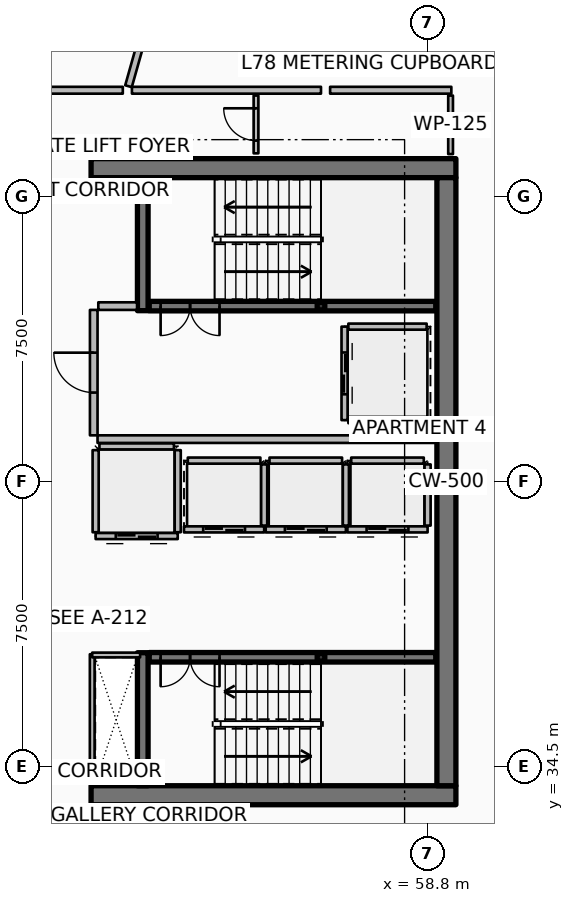
"""IFC4 building model, lengths in metres.
Left out: names, types, materials, properties, quantities, classifications, styles, units other than length and angle.
Written with IfcOpenShell. Run it as: python <this file> out.ifc"""

import sys

from ifc_helpers import new_model, si_unit, direction, frame, frame_2d, origin, origin_2d, place, context, subcontext, project, spatial, rectangle, hollow_rectangle, extrude, element, fill, save


model = new_model("IFC4")
c1 = context("Model", 3, precision=1e-05, world=origin(), true_north=direction((0.0, 1.0)))
c2 = subcontext(c1, "Body", "Model", "MODEL_VIEW")
j1 = project(units=[si_unit("LENGTHUNIT", "METRE"), si_unit("PLANEANGLEUNIT", "RADIAN")], contexts=[c1])
p1 = place(None, origin())
s1 = spatial("IfcSite", under=j1, at=p1, CompositionType="ELEMENT")
p2 = place(p1, origin())
s2 = spatial("IfcBuilding", under=s1, at=p2, CompositionType="ELEMENT")
p3 = place(p2, frame((0.0, 0.0, 309.85)))
s3 = spatial("IfcBuildingStorey", under=s2, at=p3, CompositionType="ELEMENT", Elevation=309.85)
for number, where, z_axis, x_axis in (
    (1, (49.95, 33.75, 0.0), (0.0, 0.0, 1.0), (1.0, 0.0, 0.0)),
    (2, (49.95, 50.25, 0.0), (0.0, 0.0, 1.0), (1.0, 0.0, 0.0)),
):
    element("IfcWall", number, at=place(p3, frame(where, z_axis=z_axis, x_axis=x_axis)), inside=s3, PredefinedType="SHEAR", context=c2, shape_type="SweptSolid", body=[
        extrude(rectangle(XDim=9.6, YDim=0.5, at=frame_2d((4.8, 0.0))), origin(), (0.0, 0.0, 1.0), 3.85),
    ])
p4 = place(p3, frame((59.3, 34.0, 0.0), z_axis=(0.0, 0.0, 1.0), x_axis=(0.0, 1.0, 0.0)))
e3 = element("IfcWall", 3, at=p4, inside=s3, PredefinedType="SHEAR", context=c2, shape_type="SweptSolid", body=[
    extrude(rectangle(XDim=16.0, YDim=0.5, at=frame_2d((8.0, 0.0))), origin(), (0.0, 0.0, 1.0), 3.85),
])
for number, where, z_axis, x_axis in (
    (4, (51.31, 46.5, 0.0), (0.0, 0.0, 1.0), (0.0, 1.0, 0.0)),
    (5, (51.31, 34.0, 0.0), (0.0, 0.0, 1.0), (0.0, 1.0, 0.0)),
):
    element("IfcWall", number, at=place(p3, frame(where, z_axis=z_axis, x_axis=x_axis)), inside=s3, PredefinedType="SHEAR", context=c2, shape_type="SweptSolid", body=[
        extrude(rectangle(XDim=3.5, YDim=0.28, at=frame_2d((1.75, 0.0))), origin(), (0.0, 0.0, 1.0), 3.85),
    ])
for number, where, z_axis, x_axis in (
    (6, (56.0, 46.62, 0.0), (0.0, 0.0, 1.0), (1.0, 0.0, 0.0)),
    (7, (56.0, 37.38, 0.0), (0.0, 0.0, 1.0), (1.0, 0.0, 0.0)),
):
    element("IfcColumn", number, at=place(p3, frame(where, z_axis=z_axis, x_axis=x_axis)), inside=s3, PredefinedType="COLUMN", context=c2, shape_type="SweptSolid", body=[
        extrude(hollow_rectangle(XDim=0.2, YDim=0.2, WallThickness=0.01, InnerFilletRadius=0.01, OuterFilletRadius=0.02, at=origin_2d()), origin(), (0.0, 0.0, 1.0), 1.72),
    ])
p5 = place(p3, frame((51.48, 46.62, 0.0), z_axis=(0.0, 0.0, 1.0), x_axis=(1.0, 0.0, 0.0)))
e8 = element("IfcWall", 8, at=p5, inside=s3, PredefinedType="SOLIDWALL", context=c2, shape_type="SweptSolid", body=[
    extrude(rectangle(XDim=7.54, YDim=0.25, at=frame_2d((3.77, 0.0))), origin(), (0.0, 0.0, 1.0), 3.45),
])
p6 = place(p5, frame((0.3, 0.0, 0.0)))
e9 = element("IfcOpeningElement", 9, at=p6, cuts=e8, PredefinedType="OPENING", context=c2, shape_type="SweptSolid", body=[
    extrude(rectangle(XDim=1.55, YDim=2.15, at=frame_2d((0.775, 1.075))), frame((0.0, 0.135, 0.0), z_axis=(0.0, -1.0, 0.0), x_axis=(1.0, 0.0, 0.0)), (0.0, 0.0, 1.0), 0.27),
])
p7 = place(p3, frame((51.48, 37.38, 0.0), z_axis=(0.0, 0.0, 1.0), x_axis=(1.0, 0.0, 0.0)))
e10 = element("IfcWall", 10, at=p7, inside=s3, PredefinedType="SOLIDWALL", context=c2, shape_type="SweptSolid", body=[
    extrude(rectangle(XDim=7.54, YDim=0.25, at=frame_2d((3.77, 0.0))), origin(), (0.0, 0.0, 1.0), 3.45),
])
p8 = place(p7, frame((0.3, 0.0, 0.0)))
e11 = element("IfcOpeningElement", 11, at=p8, cuts=e10, PredefinedType="OPENING", context=c2, shape_type="SweptSolid", body=[
    extrude(rectangle(XDim=1.55, YDim=2.15, at=frame_2d((0.775, 1.075))), frame((0.0, 0.135, 0.0), z_axis=(0.0, -1.0, 0.0), x_axis=(1.0, 0.0, 0.0)), (0.0, 0.0, 1.0), 0.27),
])
p9 = place(p3, frame((54.505, 40.745, 0.0), z_axis=(0.0, 0.0, 1.0), x_axis=(-1.0, 0.0, 0.0)))
e12 = element("IfcWall", 12, at=p9, inside=s3, PredefinedType="PARTITIONING", context=c2, shape_type="SweptSolid", body=[
    extrude(rectangle(XDim=2.11, YDim=0.16, at=frame_2d((1.055, 0.0))), origin(), (0.0, 0.0, 1.0), 3.45),
])
p10 = place(p9, frame((0.505, 0.0, 0.0)))
e13 = element("IfcOpeningElement", 13, at=p10, cuts=e12, PredefinedType="OPENING", context=c2, shape_type="SweptSolid", body=[
    extrude(rectangle(XDim=1.1, YDim=2.1, at=frame_2d((0.55, 1.05))), frame((0.0, 0.09, 0.0), z_axis=(0.0, -1.0, 0.0), x_axis=(1.0, 0.0, 0.0)), (0.0, 0.0, 1.0), 0.18),
])
p11 = place(p3, frame((54.505, 40.845, 0.0), z_axis=(0.0, 0.0, 1.0), x_axis=(0.0, 1.0, 0.0)))
e14 = element("IfcWall", 14, at=p11, inside=s3, PredefinedType="PARTITIONING", context=c2, shape_type="SweptSolid", body=[
    extrude(rectangle(XDim=1.61, YDim=0.16, at=frame_2d((0.805, 0.0))), origin(), (0.0, 0.0, 1.0), 3.45),
])
p12 = place(p3, frame((52.495, 42.555, 0.0), z_axis=(0.0, 0.0, 1.0), x_axis=(1.0, 0.0, 0.0)))
e15 = element("IfcWall", 15, at=p12, inside=s3, PredefinedType="PARTITIONING", context=c2, shape_type="SweptSolid", body=[
    extrude(rectangle(XDim=1.91, YDim=0.16, at=frame_2d((0.955, 0.0))), origin(), (0.0, 0.0, 1.0), 3.45),
])
p13 = place(p3, frame((56.655, 40.745, 0.0), z_axis=(0.0, 0.0, 1.0), x_axis=(-1.0, 0.0, 0.0)))
e16 = element("IfcWall", 16, at=p13, inside=s3, PredefinedType="PARTITIONING", context=c2, shape_type="SweptSolid", body=[
    extrude(rectangle(XDim=2.11, YDim=0.16, at=frame_2d((1.055, 0.0))), origin(), (0.0, 0.0, 1.0), 3.45),
])
p14 = place(p13, frame((0.505, 0.0, 0.0)))
e17 = element("IfcOpeningElement", 17, at=p14, cuts=e16, PredefinedType="OPENING", context=c2, shape_type="SweptSolid", body=[
    extrude(rectangle(XDim=1.1, YDim=2.1, at=frame_2d((0.55, 1.05))), frame((0.0, 0.09, 0.0), z_axis=(0.0, -1.0, 0.0), x_axis=(1.0, 0.0, 0.0)), (0.0, 0.0, 1.0), 0.18),
])
p15 = place(p3, frame((56.655, 40.845, 0.0), z_axis=(0.0, 0.0, 1.0), x_axis=(0.0, 1.0, 0.0)))
e18 = element("IfcWall", 18, at=p15, inside=s3, PredefinedType="PARTITIONING", context=c2, shape_type="SweptSolid", body=[
    extrude(rectangle(XDim=1.61, YDim=0.16, at=frame_2d((0.805, 0.0))), origin(), (0.0, 0.0, 1.0), 3.45),
])
p16 = place(p3, frame((54.645, 42.555, 0.0), z_axis=(0.0, 0.0, 1.0), x_axis=(1.0, 0.0, 0.0)))
e19 = element("IfcWall", 19, at=p16, inside=s3, PredefinedType="PARTITIONING", context=c2, shape_type="SweptSolid", body=[
    extrude(rectangle(XDim=1.91, YDim=0.16, at=frame_2d((0.955, 0.0))), origin(), (0.0, 0.0, 1.0), 3.45),
])
p17 = place(p3, frame((58.805, 40.745, 0.0), z_axis=(0.0, 0.0, 1.0), x_axis=(-1.0, 0.0, 0.0)))
e20 = element("IfcWall", 20, at=p17, inside=s3, PredefinedType="PARTITIONING", context=c2, shape_type="SweptSolid", body=[
    extrude(rectangle(XDim=2.11, YDim=0.16, at=frame_2d((1.055, 0.0))), origin(), (0.0, 0.0, 1.0), 3.45),
])
p18 = place(p17, frame((0.505, 0.0, 0.0)))
e21 = element("IfcOpeningElement", 21, at=p18, cuts=e20, PredefinedType="OPENING", context=c2, shape_type="SweptSolid", body=[
    extrude(rectangle(XDim=1.1, YDim=2.1, at=frame_2d((0.55, 1.05))), frame((0.0, 0.09, 0.0), z_axis=(0.0, -1.0, 0.0), x_axis=(1.0, 0.0, 0.0)), (0.0, 0.0, 1.0), 0.18),
])
p19 = place(p3, frame((58.805, 40.845, 0.0), z_axis=(0.0, 0.0, 1.0), x_axis=(0.0, 1.0, 0.0)))
e22 = element("IfcWall", 22, at=p19, inside=s3, PredefinedType="PARTITIONING", context=c2, shape_type="SweptSolid", body=[
    extrude(rectangle(XDim=1.61, YDim=0.16, at=frame_2d((0.805, 0.0))), origin(), (0.0, 0.0, 1.0), 3.45),
])
p20 = place(p3, frame((56.795, 42.555, 0.0), z_axis=(0.0, 0.0, 1.0), x_axis=(1.0, 0.0, 0.0)))
e23 = element("IfcWall", 23, at=p20, inside=s3, PredefinedType="PARTITIONING", context=c2, shape_type="SweptSolid", body=[
    extrude(rectangle(XDim=1.91, YDim=0.16, at=frame_2d((0.955, 0.0))), origin(), (0.0, 0.0, 1.0), 3.45),
])
p21 = place(p3, frame((56.62, 46.08, 0.0), z_axis=(0.0, 0.0, 1.0), x_axis=(0.0, -1.0, 0.0)))
e24 = element("IfcWall", 24, at=p21, inside=s3, PredefinedType="PARTITIONING", context=c2, shape_type="SweptSolid", body=[
    extrude(rectangle(XDim=2.46, YDim=0.16, at=frame_2d((1.23, 0.0))), origin(), (0.0, 0.0, 1.0), 3.45),
])
p22 = place(p21, frame((0.68, 0.0, 0.0)))
e25 = element("IfcOpeningElement", 25, at=p22, cuts=e24, PredefinedType="OPENING", context=c2, shape_type="SweptSolid", body=[
    extrude(rectangle(XDim=1.1, YDim=2.1, at=frame_2d((0.55, 1.05))), frame((0.0, 0.09, 0.0), z_axis=(0.0, -1.0, 0.0), x_axis=(1.0, 0.0, 0.0)), (0.0, 0.0, 1.0), 0.18),
])
for number, where, z_axis, x_axis in (
    (26, (56.72, 46.08, 0.0), (0.0, 0.0, 1.0), (1.0, 0.0, 0.0)),
    (27, (56.72, 43.62, 0.0), (0.0, 0.0, 1.0), (1.0, 0.0, 0.0)),
):
    element("IfcWall", number, at=place(p3, frame(where, z_axis=z_axis, x_axis=x_axis)), inside=s3, PredefinedType="PARTITIONING", context=c2, shape_type="SweptSolid", body=[
        extrude(rectangle(XDim=2.06, YDim=0.16, at=frame_2d((1.03, 0.0))), origin(), (0.0, 0.0, 1.0), 3.45),
    ])
p23 = place(p3, frame((52.23, 40.57, 0.0), z_axis=(0.0, 0.0, 1.0), x_axis=(-1.0, 0.0, 0.0)))
e28 = element("IfcWall", 28, at=p23, inside=s3, PredefinedType="PARTITIONING", context=c2, shape_type="SweptSolid", body=[
    extrude(rectangle(XDim=2.16, YDim=0.16, at=frame_2d((1.08, 0.0))), origin(), (0.0, 0.0, 1.0), 3.45),
])
p24 = place(p23, frame((0.53, 0.0, 0.0)))
e29 = element("IfcOpeningElement", 29, at=p24, cuts=e28, PredefinedType="OPENING", context=c2, shape_type="SweptSolid", body=[
    extrude(rectangle(XDim=1.1, YDim=2.1, at=frame_2d((0.55, 1.05))), frame((0.0, 0.09, 0.0), z_axis=(0.0, -1.0, 0.0), x_axis=(1.0, 0.0, 0.0)), (0.0, 0.0, 1.0), 0.18),
])
for number, where, z_axis, x_axis in (
    (30, (52.23, 40.67, 0.0), (0.0, 0.0, 1.0), (0.0, 1.0, 0.0)),
    (31, (50.07, 40.67, 0.0), (0.0, 0.0, 1.0), (0.0, 1.0, 0.0)),
):
    element("IfcWall", number, at=place(p3, frame(where, z_axis=z_axis, x_axis=x_axis)), inside=s3, PredefinedType="PARTITIONING", context=c2, shape_type="SweptSolid", body=[
        extrude(rectangle(XDim=2.16, YDim=0.16, at=frame_2d((1.08, 0.0))), origin(), (0.0, 0.0, 1.0), 3.45),
    ])
p25 = place(p3, frame((50.17, 42.93, 0.0), z_axis=(0.0, 0.0, 1.0), x_axis=(1.0, 0.0, 0.0)))
e32 = element("IfcWall", 32, at=p25, inside=s3, PredefinedType="PARTITIONING", context=c2, shape_type="SweptSolid", body=[
    extrude(rectangle(XDim=1.96, YDim=0.16, at=frame_2d((0.98, 0.0))), origin(), (0.0, 0.0, 1.0), 3.45),
])
p26 = place(p3, frame((50.12, 43.12, 0.0), z_axis=(0.0, 0.0, 1.0), x_axis=(1.0, 0.0, 0.0)))
e33 = element("IfcWall", 33, at=p26, inside=s3, PredefinedType="PARTITIONING", context=c2, shape_type="SweptSolid", body=[
    extrude(rectangle(XDim=8.88, YDim=0.2, at=frame_2d((4.44, 0.0))), origin(), (0.0, 0.0, 1.0), 3.45),
])
p27 = place(p3, frame((50.14, 46.62, 0.0), z_axis=(0.0, 0.0, 1.0), x_axis=(1.0, 0.0, 0.0)))
e34 = element("IfcWall", 34, at=p27, inside=s3, PredefinedType="PARTITIONING", context=c2, shape_type="SweptSolid", body=[
    extrude(rectangle(XDim=1.02, YDim=0.2, at=frame_2d((0.51, 0.0))), origin(), (0.0, 0.0, 1.0), 3.45),
])
p28 = place(p3, frame((50.02, 43.22, 0.0), z_axis=(0.0, 0.0, 1.0), x_axis=(0.0, 1.0, 0.0)))
e35 = element("IfcWall", 35, at=p28, inside=s3, PredefinedType="PARTITIONING", context=c2, shape_type="SweptSolid", body=[
    extrude(rectangle(XDim=3.3, YDim=0.2, at=frame_2d((1.65, 0.0))), origin(), (0.0, 0.0, 1.0), 3.45),
])
p29 = place(p28, frame((1.125, 0.0, 0.0)))
e36 = element("IfcOpeningElement", 36, at=p29, cuts=e35, PredefinedType="OPENING", context=c2, shape_type="SweptSolid", body=[
    extrude(rectangle(XDim=1.05, YDim=2.1, at=frame_2d((0.525, 1.05))), frame((0.0, 0.11, 0.0), z_axis=(0.0, -1.0, 0.0), x_axis=(1.0, 0.0, 0.0)), (0.0, 0.0, 1.0), 0.22),
])
p30 = place(p3, frame((49.98, 34.06, 0.0), z_axis=(0.0, 0.0, 1.0), x_axis=(0.0, 1.0, 0.0)))
e37 = element("IfcWall", 37, at=p30, inside=s3, PredefinedType="PARTITIONING", context=c2, shape_type="SweptSolid", body=[
    extrude(rectangle(XDim=3.4, YDim=0.125, at=frame_2d((1.7, 0.0))), origin(), (0.0, 0.0, 1.0), 2.89),
])
p31 = place(p3, frame((49.98, 37.44, 0.0), z_axis=(0.0, 0.0, 1.0), x_axis=(1.0, 0.0, 0.0)))
e38 = element("IfcWall", 38, at=p31, inside=s3, PredefinedType="PARTITIONING", context=c2, shape_type="SweptSolid", body=[
    extrude(rectangle(XDim=1.26, YDim=0.125, at=frame_2d((0.63, 0.0))), origin(), (0.0, 0.0, 1.0), 2.89),
])
p32 = place(p3, frame((59.41, 50.62, 0.0), z_axis=(0.0, 0.0, 1.0), x_axis=(0.0, 1.0, 0.0)))
e39 = element("IfcWall", 39, at=p32, inside=s3, PredefinedType="PARTITIONING", context=c2, shape_type="SweptSolid", body=[
    extrude(rectangle(XDim=1.54, YDim=0.125, at=frame_2d((0.77, 0.0))), origin(), (0.0, 0.0, 1.0), 2.89),
])
p33 = place(p3, frame((54.29, 50.64, 0.0), z_axis=(0.0, 0.0, 1.0), x_axis=(0.0, 1.0, 0.0)))
e40 = element("IfcWall", 40, at=p33, inside=s3, PredefinedType="PARTITIONING", context=c2, shape_type="SweptSolid", body=[
    extrude(rectangle(XDim=1.52, YDim=0.125, at=frame_2d((0.76, 0.0))), origin(), (0.0, 0.0, 1.0), 2.89),
])
p34 = place(p33, frame((0.335, 0.0, 0.0)))
e41 = element("IfcOpeningElement", 41, at=p34, cuts=e40, PredefinedType="OPENING", context=c2, shape_type="SweptSolid", body=[
    extrude(rectangle(XDim=0.85, YDim=2.06, at=frame_2d((0.425, 1.03))), frame((0.0, 0.073, 0.0), z_axis=(0.0, -1.0, 0.0), x_axis=(1.0, 0.0, 0.0)), (0.0, 0.0, 1.0), 0.145),
])
p35 = place(p3, frame((50.935, 52.406, 0.0), z_axis=(0.0, 0.0, 1.0), x_axis=(0.271447701057, 0.962453191376, 0.0)))
e42 = element("IfcWall", 42, at=p35, inside=s3, PredefinedType="PARTITIONING", context=c2, shape_type="SweptSolid", body=[
    extrude(rectangle(XDim=13.492, YDim=0.18, at=frame_2d((6.746, 0.0))), origin(), (0.0, 0.0, 1.0), 2.407),
])
p36 = place(p3, frame((50.785, 52.3, 0.0), z_axis=(0.0, 0.0, 1.0), x_axis=(-1.0, 0.0, 0.0)))
e43 = element("IfcWall", 43, at=p36, inside=s3, PredefinedType="PARTITIONING", context=c2, shape_type="SweptSolid", body=[
    extrude(rectangle(XDim=3.884, YDim=0.18, at=frame_2d((1.942, 0.0))), origin(), (0.0, 0.0, 1.0), 2.407),
])
p37 = place(p3, frame((59.43, 52.3, 0.0), z_axis=(0.0, 0.0, 1.0), x_axis=(-1.0, 0.0, 0.0)))
e44 = element("IfcWall", 44, at=p37, inside=s3, PredefinedType="PARTITIONING", context=c2, shape_type="SweptSolid", body=[
    extrude(rectangle(XDim=3.19, YDim=0.18, at=frame_2d((1.595, 0.0))), origin(), (0.0, 0.0, 1.0), 2.407),
])
p38 = place(p3, frame((62.134, 52.764, 0.0), z_axis=(0.0, 0.0, 1.0), x_axis=(-0.699585598454, 0.714548801997, 0.0)))
e45 = element("IfcWall", 45, at=p38, inside=s3, PredefinedType="PARTITIONING", context=c2, shape_type="SweptSolid", body=[
    extrude(rectangle(XDim=4.373, YDim=0.125, at=frame_2d((2.187, 0.0))), origin(), (0.0, 0.0, 1.0), 2.407),
])
p39 = place(p38, frame((1.736, 0.0, 0.0)))
e46 = element("IfcOpeningElement", 46, at=p39, cuts=e45, PredefinedType="OPENING", context=c2, shape_type="SweptSolid", body=[
    extrude(rectangle(XDim=0.9, YDim=2.08, at=frame_2d((0.45, 1.04))), frame((0.0, 0.073, 0.0), z_axis=(0.0, -1.0, 0.0), x_axis=(1.0, 0.0, 0.0)), (0.0, 0.0, 1.0), 0.145),
])
p40 = place(p3, frame((56.0, 52.3, 0.0), z_axis=(0.0, 0.0, 1.0), x_axis=(-1.0, 0.0, 0.0)))
e47 = element("IfcWall", 47, at=p40, inside=s3, PredefinedType="PARTITIONING", context=c2, shape_type="SweptSolid", body=[
    extrude(rectangle(XDim=4.975, YDim=0.18, at=frame_2d((2.488, 0.0))), origin(), (0.0, 0.0, 1.0), 2.407),
])
p41 = place(p6, origin())
e48 = element("IfcDoor", 48, at=p41, inside=s3, OperationType="DOUBLE_DOOR_SINGLE_SWING", PredefinedType="DOOR", context=c2, shape_type="SweptSolid", body=[
    extrude(rectangle(XDim=1.55, YDim=2.15, at=frame_2d((0.775, 1.075))), frame((0.0, 0.025, 0.0), z_axis=(0.0, -1.0, 0.0), x_axis=(1.0, 0.0, 0.0)), (0.0, 0.0, 1.0), 0.05),
])
fill(e9, e48)
p42 = place(p8, origin())
e49 = element("IfcDoor", 49, at=p42, inside=s3, OperationType="DOUBLE_DOOR_SINGLE_SWING", PredefinedType="DOOR", context=c2, shape_type="SweptSolid", body=[
    extrude(rectangle(XDim=1.55, YDim=2.15, at=frame_2d((0.775, 1.075))), frame((0.0, 0.025, 0.0), z_axis=(0.0, -1.0, 0.0), x_axis=(1.0, 0.0, 0.0)), (0.0, 0.0, 1.0), 0.05),
])
fill(e11, e49)
p43 = place(p10, origin())
e50 = element("IfcDoor", 50, at=p43, inside=s3, OperationType="DOUBLE_DOOR_SLIDING", PredefinedType="DOOR", context=c2, shape_type="SweptSolid", body=[
    extrude(rectangle(XDim=1.1, YDim=2.1, at=frame_2d((0.55, 1.05))), frame((0.0, 0.025, 0.0), z_axis=(0.0, -1.0, 0.0), x_axis=(1.0, 0.0, 0.0)), (0.0, 0.0, 1.0), 0.05),
])
fill(e13, e50)
p44 = place(p14, origin())
e51 = element("IfcDoor", 51, at=p44, inside=s3, OperationType="DOUBLE_DOOR_SLIDING", PredefinedType="DOOR", context=c2, shape_type="SweptSolid", body=[
    extrude(rectangle(XDim=1.1, YDim=2.1, at=frame_2d((0.55, 1.05))), frame((0.0, 0.025, 0.0), z_axis=(0.0, -1.0, 0.0), x_axis=(1.0, 0.0, 0.0)), (0.0, 0.0, 1.0), 0.05),
])
fill(e17, e51)
p45 = place(p18, origin())
e52 = element("IfcDoor", 52, at=p45, inside=s3, OperationType="DOUBLE_DOOR_SLIDING", PredefinedType="DOOR", context=c2, shape_type="SweptSolid", body=[
    extrude(rectangle(XDim=1.1, YDim=2.1, at=frame_2d((0.55, 1.05))), frame((0.0, 0.025, 0.0), z_axis=(0.0, -1.0, 0.0), x_axis=(1.0, 0.0, 0.0)), (0.0, 0.0, 1.0), 0.05),
])
fill(e21, e52)
p46 = place(p22, origin())
e53 = element("IfcDoor", 53, at=p46, inside=s3, OperationType="DOUBLE_DOOR_SLIDING", PredefinedType="DOOR", context=c2, shape_type="SweptSolid", body=[
    extrude(rectangle(XDim=1.1, YDim=2.1, at=frame_2d((0.55, 1.05))), frame((0.0, 0.025, 0.0), z_axis=(0.0, -1.0, 0.0), x_axis=(1.0, 0.0, 0.0)), (0.0, 0.0, 1.0), 0.05),
])
fill(e25, e53)
p47 = place(p24, origin())
e54 = element("IfcDoor", 54, at=p47, inside=s3, OperationType="DOUBLE_DOOR_SLIDING", PredefinedType="DOOR", context=c2, shape_type="SweptSolid", body=[
    extrude(rectangle(XDim=1.1, YDim=2.1, at=frame_2d((0.55, 1.05))), frame((0.0, 0.025, 0.0), z_axis=(0.0, -1.0, 0.0), x_axis=(1.0, 0.0, 0.0)), (0.0, 0.0, 1.0), 0.05),
])
fill(e29, e54)
p48 = place(p29, origin())
e55 = element("IfcDoor", 55, at=p48, inside=s3, OperationType="SINGLE_SWING_RIGHT", PredefinedType="DOOR", context=c2, shape_type="SweptSolid", body=[
    extrude(rectangle(XDim=1.05, YDim=2.1, at=frame_2d((0.525, 1.05))), frame((0.0, 0.025, 0.0), z_axis=(0.0, -1.0, 0.0), x_axis=(1.0, 0.0, 0.0)), (0.0, 0.0, 1.0), 0.05),
])
fill(e36, e55)
p49 = place(p34, origin())
e56 = element("IfcDoor", 56, at=p49, inside=s3, OperationType="SINGLE_SWING_RIGHT", PredefinedType="DOOR", context=c2, shape_type="SweptSolid", body=[
    extrude(rectangle(XDim=0.85, YDim=2.06, at=frame_2d((0.425, 1.03))), frame((0.0, 0.025, 0.0), z_axis=(0.0, -1.0, 0.0), x_axis=(1.0, 0.0, 0.0)), (0.0, 0.0, 1.0), 0.05),
])
fill(e41, e56)
save(model, sys.argv[1])
